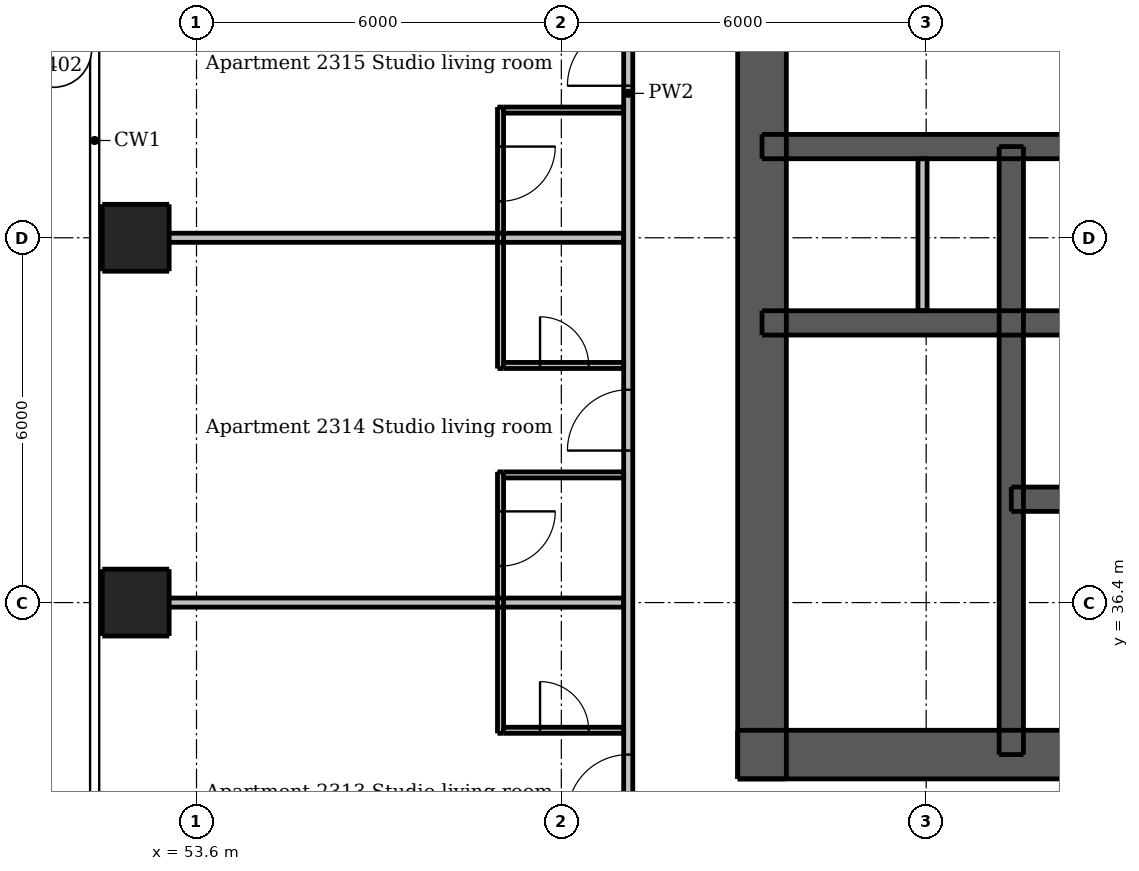
"""IFC4 building model, lengths in metres.
Left out: names, types, materials, properties, quantities, classifications, styles, units other than length and angle.
Written with IfcOpenShell. Run it as: python <this file> out.ifc"""

import sys

from ifc_helpers import new_model, si_unit, direction, frame, frame_2d, origin, origin_2d, place, context, subcontext, project, spatial, rectangle, extrude, element, fill, save


model = new_model("IFC4")
c1 = context("Model", 3, precision=1e-05, world=origin(), true_north=direction((0.0, 1.0)))
c2 = subcontext(c1, "Body", "Model", "MODEL_VIEW")
j1 = project(units=[si_unit("LENGTHUNIT", "METRE"), si_unit("PLANEANGLEUNIT", "RADIAN")], contexts=[c1])
p1 = place(None, origin())
s1 = spatial("IfcSite", under=j1, at=p1, CompositionType="ELEMENT")
p2 = place(p1, origin())
s2 = spatial("IfcBuilding", under=s1, at=p2, CompositionType="ELEMENT")
p3 = place(p2, frame((0.0, 0.0, 88.6)))
s3 = spatial("IfcBuildingStorey", under=s2, at=p3, CompositionType="ELEMENT", Elevation=88.6)
p4 = place(p3, frame((62.5, 33.9, 0.0), z_axis=(0.0, 0.0, 1.0), x_axis=(1.0, 0.0, 0.0)))
e1 = element("IfcWall", 1, at=p4, inside=s3, PredefinedType="SHEAR", context=c2, shape_type="SweptSolid", body=[
    extrude(rectangle(XDim=24.0, YDim=0.8, at=frame_2d((12.0, 0.0))), origin(), (0.0, 0.0, 1.0), 3.05),
])
p5 = place(p4, frame((2.0, 0.0, 0.0)))
e2 = element("IfcOpeningElement", 2, at=p5, cuts=e1, PredefinedType="OPENING", context=c2, shape_type="SweptSolid", body=[
    extrude(rectangle(XDim=1.1, YDim=2.1, at=frame_2d((0.55, 1.05))), frame((0.0, 0.41, 0.0), z_axis=(0.0, -1.0, 0.0), x_axis=(1.0, 0.0, 0.0)), (0.0, 0.0, 1.0), 0.82),
])
p6 = place(p4, frame((20.9, 0.0, 0.0)))
e3 = element("IfcOpeningElement", 3, at=p6, cuts=e1, PredefinedType="OPENING", context=c2, shape_type="SweptSolid", body=[
    extrude(rectangle(XDim=1.1, YDim=2.1, at=frame_2d((0.55, 1.05))), frame((0.0, 0.41, 0.0), z_axis=(0.0, -1.0, 0.0), x_axis=(1.0, 0.0, 0.0)), (0.0, 0.0, 1.0), 0.82),
])
p7 = place(p4, frame((8.0, 0.0, 0.0)))
e4 = element("IfcOpeningElement", 4, at=p7, cuts=e1, PredefinedType="OPENING", context=c2, shape_type="SweptSolid", body=[
    extrude(rectangle(XDim=1.1, YDim=2.1, at=frame_2d((0.55, 1.05))), frame((0.0, 0.41, 0.0), z_axis=(0.0, -1.0, 0.0), x_axis=(1.0, 0.0, 0.0)), (0.0, 0.0, 1.0), 0.82),
])
p8 = place(p4, frame((13.525, 0.0, 0.0)))
e5 = element("IfcOpeningElement", 5, at=p8, cuts=e1, PredefinedType="OPENING", context=c2, shape_type="SweptSolid", body=[
    extrude(rectangle(XDim=0.9, YDim=2.1, at=frame_2d((0.45, 1.05))), frame((0.0, 0.41, 0.0), z_axis=(0.0, -1.0, 0.0), x_axis=(1.0, 0.0, 0.0)), (0.0, 0.0, 1.0), 0.82),
])
p9 = place(p4, frame((17.075, 0.0, 0.0)))
e6 = element("IfcOpeningElement", 6, at=p9, cuts=e1, PredefinedType="OPENING", context=c2, shape_type="SweptSolid", body=[
    extrude(rectangle(XDim=0.9, YDim=2.1, at=frame_2d((0.45, 1.05))), frame((0.0, 0.41, 0.0), z_axis=(0.0, -1.0, 0.0), x_axis=(1.0, 0.0, 0.0)), (0.0, 0.0, 1.0), 0.82),
])
p10 = place(p3, frame((62.9, 33.5, 0.0), z_axis=(0.0, 0.0, 1.0), x_axis=(0.0, 1.0, 0.0)))
e7 = element("IfcWall", 7, at=p10, inside=s3, PredefinedType="SHEAR", context=c2, shape_type="SweptSolid", body=[
    extrude(rectangle(XDim=24.0, YDim=0.8, at=frame_2d((12.0, 0.0))), origin(), (0.0, 0.0, 1.0), 3.05),
])
p11 = place(p10, frame((11.2, 0.0, 0.0)))
e8 = element("IfcOpeningElement", 8, at=p11, cuts=e7, PredefinedType="OPENING", context=c2, shape_type="SweptSolid", body=[
    extrude(rectangle(XDim=1.6, YDim=2.1, at=frame_2d((0.8, 1.05))), frame((0.0, 0.41, 0.0), z_axis=(0.0, -1.0, 0.0), x_axis=(1.0, 0.0, 0.0)), (0.0, 0.0, 1.0), 0.82),
])
p12 = place(p3, frame((62.9, 41.0, 0.0), z_axis=(0.0, 0.0, 1.0), x_axis=(1.0, 0.0, 0.0)))
e9 = element("IfcWall", 9, at=p12, inside=s3, PredefinedType="SHEAR", context=c2, shape_type="SweptSolid", body=[
    extrude(rectangle(XDim=23.2, YDim=0.4, at=frame_2d((11.6, 0.0))), origin(), (0.0, 0.0, 1.0), 3.05),
])
p13 = place(p3, frame((62.9, 43.9, 0.0), z_axis=(0.0, 0.0, 1.0), x_axis=(1.0, 0.0, 0.0)))
e10 = element("IfcWall", 10, at=p13, inside=s3, PredefinedType="SHEAR", context=c2, shape_type="SweptSolid", body=[
    extrude(rectangle(XDim=23.2, YDim=0.4, at=frame_2d((11.6, 0.0))), origin(), (0.0, 0.0, 1.0), 3.05),
])
p14 = place(p13, frame((1.07, 0.0, 0.0)))
e11 = element("IfcOpeningElement", 11, at=p14, cuts=e10, PredefinedType="OPENING", context=c2, shape_type="SweptSolid", body=[
    extrude(rectangle(XDim=0.9, YDim=2.1, at=frame_2d((0.45, 1.05))), frame((0.0, 0.21, 0.0), z_axis=(0.0, -1.0, 0.0), x_axis=(1.0, 0.0, 0.0)), (0.0, 0.0, 1.0), 0.42),
])
p15 = place(p13, frame((2.87, 0.0, 0.0)))
e12 = element("IfcOpeningElement", 12, at=p15, cuts=e10, PredefinedType="OPENING", context=c2, shape_type="SweptSolid", body=[
    extrude(rectangle(XDim=0.8, YDim=2.1, at=frame_2d((0.4, 1.05))), frame((0.0, 0.21, 0.0), z_axis=(0.0, -1.0, 0.0), x_axis=(1.0, 0.0, 0.0)), (0.0, 0.0, 1.0), 0.42),
])
p16 = place(p13, frame((20.6, 0.0, 0.0)))
e13 = element("IfcOpeningElement", 13, at=p16, cuts=e10, PredefinedType="OPENING", context=c2, shape_type="SweptSolid", body=[
    extrude(rectangle(XDim=0.9, YDim=2.1, at=frame_2d((0.45, 1.05))), frame((0.0, 0.21, 0.0), z_axis=(0.0, -1.0, 0.0), x_axis=(1.0, 0.0, 0.0)), (0.0, 0.0, 1.0), 0.42),
])
p17 = place(p13, frame((4.8, 0.0, 0.0)))
e14 = element("IfcOpeningElement", 14, at=p17, cuts=e10, PredefinedType="OPENING", context=c2, shape_type="SweptSolid", body=[
    extrude(rectangle(XDim=1.1, YDim=2.1, at=frame_2d((0.55, 1.05))), frame((0.0, 0.21, 0.0), z_axis=(0.0, -1.0, 0.0), x_axis=(1.0, 0.0, 0.0)), (0.0, 0.0, 1.0), 0.42),
])
p18 = place(p13, frame((7.3, 0.0, 0.0)))
e15 = element("IfcOpeningElement", 15, at=p18, cuts=e10, PredefinedType="OPENING", context=c2, shape_type="SweptSolid", body=[
    extrude(rectangle(XDim=1.1, YDim=2.1, at=frame_2d((0.55, 1.05))), frame((0.0, 0.21, 0.0), z_axis=(0.0, -1.0, 0.0), x_axis=(1.0, 0.0, 0.0)), (0.0, 0.0, 1.0), 0.42),
])
p19 = place(p13, frame((9.8, 0.0, 0.0)))
e16 = element("IfcOpeningElement", 16, at=p19, cuts=e10, PredefinedType="OPENING", context=c2, shape_type="SweptSolid", body=[
    extrude(rectangle(XDim=1.1, YDim=2.1, at=frame_2d((0.55, 1.05))), frame((0.0, 0.21, 0.0), z_axis=(0.0, -1.0, 0.0), x_axis=(1.0, 0.0, 0.0)), (0.0, 0.0, 1.0), 0.42),
])
p20 = place(p13, frame((12.3, 0.0, 0.0)))
e17 = element("IfcOpeningElement", 17, at=p20, cuts=e10, PredefinedType="OPENING", context=c2, shape_type="SweptSolid", body=[
    extrude(rectangle(XDim=1.1, YDim=2.1, at=frame_2d((0.55, 1.05))), frame((0.0, 0.21, 0.0), z_axis=(0.0, -1.0, 0.0), x_axis=(1.0, 0.0, 0.0)), (0.0, 0.0, 1.0), 0.42),
])
p21 = place(p13, frame((14.8, 0.0, 0.0)))
e18 = element("IfcOpeningElement", 18, at=p21, cuts=e10, PredefinedType="OPENING", context=c2, shape_type="SweptSolid", body=[
    extrude(rectangle(XDim=1.1, YDim=2.1, at=frame_2d((0.55, 1.05))), frame((0.0, 0.21, 0.0), z_axis=(0.0, -1.0, 0.0), x_axis=(1.0, 0.0, 0.0)), (0.0, 0.0, 1.0), 0.42),
])
p22 = place(p13, frame((17.3, 0.0, 0.0)))
e19 = element("IfcOpeningElement", 19, at=p22, cuts=e10, PredefinedType="OPENING", context=c2, shape_type="SweptSolid", body=[
    extrude(rectangle(XDim=1.1, YDim=2.1, at=frame_2d((0.55, 1.05))), frame((0.0, 0.21, 0.0), z_axis=(0.0, -1.0, 0.0), x_axis=(1.0, 0.0, 0.0)), (0.0, 0.0, 1.0), 0.42),
])
p23 = place(p3, frame((67.0, 33.9, 0.0), z_axis=(0.0, 0.0, 1.0), x_axis=(0.0, 1.0, 0.0)))
e20 = element("IfcWall", 20, at=p23, inside=s3, PredefinedType="SHEAR", context=c2, shape_type="SweptSolid", body=[
    extrude(rectangle(XDim=10.0, YDim=0.4, at=frame_2d((5.0, 0.0))), origin(), (0.0, 0.0, 1.0), 3.05),
])
p24 = place(p23, frame((0.6, 0.0, 0.0)))
e21 = element("IfcOpeningElement", 21, at=p24, cuts=e20, PredefinedType="OPENING", context=c2, shape_type="SweptSolid", body=[
    extrude(rectangle(XDim=1.1, YDim=2.1, at=frame_2d((0.55, 1.05))), frame((0.0, 0.21, 0.0), z_axis=(0.0, -1.0, 0.0), x_axis=(1.0, 0.0, 0.0)), (0.0, 0.0, 1.0), 0.42),
])
p25 = place(p3, frame((67.0, 38.1, 0.0), z_axis=(0.0, 0.0, 1.0), x_axis=(1.0, 0.0, 0.0)))
e22 = element("IfcWall", 22, at=p25, inside=s3, PredefinedType="SHEAR", context=c2, shape_type="SweptSolid", body=[
    extrude(rectangle(XDim=7.5, YDim=0.4, at=frame_2d((3.75, 0.0))), origin(), (0.0, 0.0, 1.0), 3.05),
])
p26 = place(p25, frame((0.7, 0.0, 0.0)))
e23 = element("IfcOpeningElement", 23, at=p26, cuts=e22, PredefinedType="OPENING", context=c2, shape_type="SweptSolid", body=[
    extrude(rectangle(XDim=1.1, YDim=2.1, at=frame_2d((0.55, 1.05))), frame((0.0, 0.21, 0.0), z_axis=(0.0, -1.0, 0.0), x_axis=(1.0, 0.0, 0.0)), (0.0, 0.0, 1.0), 0.42),
])
p27 = place(p25, frame((3.2, 0.0, 0.0)))
e24 = element("IfcOpeningElement", 24, at=p27, cuts=e22, PredefinedType="OPENING", context=c2, shape_type="SweptSolid", body=[
    extrude(rectangle(XDim=1.1, YDim=2.1, at=frame_2d((0.55, 1.05))), frame((0.0, 0.21, 0.0), z_axis=(0.0, -1.0, 0.0), x_axis=(1.0, 0.0, 0.0)), (0.0, 0.0, 1.0), 0.42),
])
p28 = place(p25, frame((5.65, 0.0, 0.0)))
e25 = element("IfcOpeningElement", 25, at=p28, cuts=e22, PredefinedType="OPENING", context=c2, shape_type="SweptSolid", body=[
    extrude(rectangle(XDim=1.2, YDim=2.1, at=frame_2d((0.6, 1.05))), frame((0.0, 0.21, 0.0), z_axis=(0.0, -1.0, 0.0), x_axis=(1.0, 0.0, 0.0)), (0.0, 0.0, 1.0), 0.42),
])
for number, where, z_axis, x_axis in (
    (26, (52.6, 36.4, 0.0), (0.0, 0.0, 1.0), (1.0, 0.0, 0.0)),
    (27, (52.6, 42.4, 0.0), (0.0, 0.0, 1.0), (1.0, 0.0, 0.0)),
):
    element("IfcColumn", number, at=place(p3, frame(where, z_axis=z_axis, x_axis=x_axis)), inside=s3, PredefinedType="COLUMN", context=c2, shape_type="SweptSolid", body=[
        extrude(rectangle(XDim=1.1, YDim=1.1, at=origin_2d()), origin(), (0.0, 0.0, 1.0), 3.05),
    ])
p29 = place(p3, frame((65.54, 41.2, 0.0), z_axis=(0.0, 0.0, 1.0), x_axis=(0.0, 1.0, 0.0)))
e28 = element("IfcWall", 28, at=p29, inside=s3, PredefinedType="PLUMBINGWALL", context=c2, shape_type="SweptSolid", body=[
    extrude(rectangle(XDim=2.5, YDim=0.15, at=frame_2d((1.25, 0.0))), origin(), (0.0, 0.0, 1.0), 3.05),
])
p30 = place(p3, frame((58.6, 38.55, 0.0), z_axis=(0.0, 0.0, 1.0), x_axis=(0.0, -1.0, 0.0)))
e29 = element("IfcWall", 29, at=p30, inside=s3, PredefinedType="PARTITIONING", context=c2, shape_type="SweptSolid", body=[
    extrude(rectangle(XDim=4.3, YDim=0.1, at=frame_2d((2.15, 0.0))), origin(), (0.0, 0.0, 1.0), 3.05),
])
p31 = place(p30, frame((0.65, 0.0, 0.0)))
e30 = element("IfcOpeningElement", 30, at=p31, cuts=e29, PredefinedType="OPENING", context=c2, shape_type="SweptSolid", body=[
    extrude(rectangle(XDim=0.9, YDim=2.1, at=frame_2d((0.45, 1.05))), frame((0.0, 0.06, 0.0), z_axis=(0.0, -1.0, 0.0), x_axis=(1.0, 0.0, 0.0)), (0.0, 0.0, 1.0), 0.12),
])
p32 = place(p3, frame((58.6, 44.55, 0.0), z_axis=(0.0, 0.0, 1.0), x_axis=(0.0, -1.0, 0.0)))
e31 = element("IfcWall", 31, at=p32, inside=s3, PredefinedType="PARTITIONING", context=c2, shape_type="SweptSolid", body=[
    extrude(rectangle(XDim=4.3, YDim=0.1, at=frame_2d((2.15, 0.0))), origin(), (0.0, 0.0, 1.0), 3.05),
])
p33 = place(p32, frame((0.65, 0.0, 0.0)))
e32 = element("IfcOpeningElement", 32, at=p33, cuts=e31, PredefinedType="OPENING", context=c2, shape_type="SweptSolid", body=[
    extrude(rectangle(XDim=0.9, YDim=2.1, at=frame_2d((0.45, 1.05))), frame((0.0, 0.06, 0.0), z_axis=(0.0, -1.0, 0.0), x_axis=(1.0, 0.0, 0.0)), (0.0, 0.0, 1.0), 0.12),
])
p34 = place(p3, frame((58.65, 44.5, 0.0), z_axis=(0.0, 0.0, 1.0), x_axis=(1.0, 0.0, 0.0)))
e33 = element("IfcWall", 33, at=p34, inside=s3, PredefinedType="PARTITIONING", context=c2, shape_type="SweptSolid", body=[
    extrude(rectangle(XDim=1.975, YDim=0.1, at=frame_2d((0.988, 0.0))), origin(), (0.0, 0.0, 1.0), 3.05),
])
p35 = place(p3, frame((58.65, 40.3, 0.0), z_axis=(0.0, 0.0, 1.0), x_axis=(1.0, 0.0, 0.0)))
e34 = element("IfcWall", 34, at=p35, inside=s3, PredefinedType="PARTITIONING", context=c2, shape_type="SweptSolid", body=[
    extrude(rectangle(XDim=1.975, YDim=0.1, at=frame_2d((0.988, 0.0))), origin(), (0.0, 0.0, 1.0), 3.05),
])
p36 = place(p35, frame((0.6, 0.0, 0.0)))
e35 = element("IfcOpeningElement", 35, at=p36, cuts=e34, PredefinedType="OPENING", context=c2, shape_type="SweptSolid", body=[
    extrude(rectangle(XDim=0.8, YDim=2.1, at=frame_2d((0.4, 1.05))), frame((0.0, 0.06, 0.0), z_axis=(0.0, -1.0, 0.0), x_axis=(1.0, 0.0, 0.0)), (0.0, 0.0, 1.0), 0.12),
])
p37 = place(p3, frame((58.65, 38.5, 0.0), z_axis=(0.0, 0.0, 1.0), x_axis=(1.0, 0.0, 0.0)))
e36 = element("IfcWall", 36, at=p37, inside=s3, PredefinedType="PARTITIONING", context=c2, shape_type="SweptSolid", body=[
    extrude(rectangle(XDim=1.975, YDim=0.1, at=frame_2d((0.988, 0.0))), origin(), (0.0, 0.0, 1.0), 3.05),
])
p38 = place(p3, frame((58.65, 34.3, 0.0), z_axis=(0.0, 0.0, 1.0), x_axis=(1.0, 0.0, 0.0)))
e37 = element("IfcWall", 37, at=p38, inside=s3, PredefinedType="PARTITIONING", context=c2, shape_type="SweptSolid", body=[
    extrude(rectangle(XDim=1.975, YDim=0.1, at=frame_2d((0.988, 0.0))), origin(), (0.0, 0.0, 1.0), 3.05),
])
p39 = place(p38, frame((0.6, 0.0, 0.0)))
e38 = element("IfcOpeningElement", 38, at=p39, cuts=e37, PredefinedType="OPENING", context=c2, shape_type="SweptSolid", body=[
    extrude(rectangle(XDim=0.8, YDim=2.1, at=frame_2d((0.4, 1.05))), frame((0.0, 0.06, 0.0), z_axis=(0.0, -1.0, 0.0), x_axis=(1.0, 0.0, 0.0)), (0.0, 0.0, 1.0), 0.12),
])
p40 = place(p3, frame((60.7, 30.325, 0.0), z_axis=(0.0, 0.0, 1.0), x_axis=(0.0, 1.0, 0.0)))
e39 = element("IfcWall", 39, at=p40, inside=s3, PredefinedType="PARTITIONING", context=c2, shape_type="SweptSolid", body=[
    extrude(rectangle(XDim=28.9, YDim=0.15, at=frame_2d((14.45, 0.0))), origin(), (0.0, 0.0, 1.0), 3.05),
])
p41 = place(p40, frame((2.575, 0.0, 0.0)))
e40 = element("IfcOpeningElement", 40, at=p41, cuts=e39, PredefinedType="OPENING", context=c2, shape_type="SweptSolid", body=[
    extrude(rectangle(XDim=1.0, YDim=2.1, at=frame_2d((0.5, 1.05))), frame((0.0, 0.085, 0.0), z_axis=(0.0, -1.0, 0.0), x_axis=(1.0, 0.0, 0.0)), (0.0, 0.0, 1.0), 0.17),
])
p42 = place(p40, frame((8.575, 0.0, 0.0)))
e41 = element("IfcOpeningElement", 41, at=p42, cuts=e39, PredefinedType="OPENING", context=c2, shape_type="SweptSolid", body=[
    extrude(rectangle(XDim=1.0, YDim=2.1, at=frame_2d((0.5, 1.05))), frame((0.0, 0.085, 0.0), z_axis=(0.0, -1.0, 0.0), x_axis=(1.0, 0.0, 0.0)), (0.0, 0.0, 1.0), 0.17),
])
p43 = place(p40, frame((14.575, 0.0, 0.0)))
e42 = element("IfcOpeningElement", 42, at=p43, cuts=e39, PredefinedType="OPENING", context=c2, shape_type="SweptSolid", body=[
    extrude(rectangle(XDim=1.0, YDim=2.1, at=frame_2d((0.5, 1.05))), frame((0.0, 0.085, 0.0), z_axis=(0.0, -1.0, 0.0), x_axis=(1.0, 0.0, 0.0)), (0.0, 0.0, 1.0), 0.17),
])
p44 = place(p40, frame((26.025, 0.0, 0.0)))
e43 = element("IfcOpeningElement", 43, at=p44, cuts=e39, PredefinedType="OPENING", context=c2, shape_type="SweptSolid", body=[
    extrude(rectangle(XDim=1.0, YDim=2.1, at=frame_2d((0.5, 1.05))), frame((0.0, 0.085, 0.0), z_axis=(0.0, -1.0, 0.0), x_axis=(1.0, 0.0, 0.0)), (0.0, 0.0, 1.0), 0.17),
])
for number, where, z_axis, x_axis in (
    (44, (52.0, 42.4, 0.0), (0.0, 0.0, 1.0), (1.0, 0.0, 0.0)),
    (45, (52.0, 36.4, 0.0), (0.0, 0.0, 1.0), (1.0, 0.0, 0.0)),
):
    element("IfcWall", number, at=place(p3, frame(where, z_axis=z_axis, x_axis=x_axis)), inside=s3, PredefinedType="PARTITIONING", context=c2, shape_type="SweptSolid", body=[
        extrude(rectangle(XDim=8.625, YDim=0.15, at=frame_2d((4.312, 0.0))), origin(), (0.0, 0.0, 1.0), 2.516),
    ])
p45 = place(p5, origin())
e46 = element("IfcDoor", 46, at=p45, inside=s3, OperationType="SINGLE_SWING_LEFT", PredefinedType="DOOR", context=c2, shape_type="SweptSolid", body=[
    extrude(rectangle(XDim=1.1, YDim=2.1, at=frame_2d((0.55, 1.05))), frame((0.0, 0.388, 0.0), z_axis=(0.0, -1.0, 0.0), x_axis=(1.0, 0.0, 0.0)), (0.0, 0.0, 1.0), 0.05),
])
fill(e2, e46)
p46 = place(p11, origin())
e47 = element("IfcDoor", 47, at=p46, inside=s3, OperationType="DOUBLE_DOOR_SINGLE_SWING", PredefinedType="DOOR", context=c2, shape_type="SweptSolid", body=[
    extrude(rectangle(XDim=1.6, YDim=2.1, at=frame_2d((0.8, 1.05))), frame((0.0, -0.337, 0.0), z_axis=(0.0, -1.0, 0.0), x_axis=(1.0, 0.0, 0.0)), (0.0, 0.0, 1.0), 0.05),
])
fill(e8, e47)
p47 = place(p24, origin())
e48 = element("IfcDoor", 48, at=p47, inside=s3, OperationType="SINGLE_SWING_RIGHT", PredefinedType="DOOR", context=c2, shape_type="SweptSolid", body=[
    extrude(rectangle(XDim=1.1, YDim=2.1, at=frame_2d((0.55, 1.05))), frame((0.0, -0.138, 0.0), z_axis=(0.0, -1.0, 0.0), x_axis=(1.0, 0.0, 0.0)), (0.0, 0.0, 1.0), 0.05),
])
fill(e21, e48)
p48 = place(p14, origin())
e49 = element("IfcDoor", 49, at=p48, inside=s3, OperationType="SINGLE_SWING_LEFT", PredefinedType="DOOR", context=c2, shape_type="SweptSolid", body=[
    extrude(rectangle(XDim=0.9, YDim=2.1, at=frame_2d((0.45, 1.05))), frame((0.0, -0.138, 0.0), z_axis=(0.0, -1.0, 0.0), x_axis=(1.0, 0.0, 0.0)), (0.0, 0.0, 1.0), 0.05),
])
fill(e11, e49)
p49 = place(p15, origin())
e50 = element("IfcDoor", 50, at=p49, inside=s3, OperationType="SINGLE_SWING_RIGHT", PredefinedType="DOOR", context=c2, shape_type="SweptSolid", body=[
    extrude(rectangle(XDim=0.8, YDim=2.1, at=frame_2d((0.4, 1.05))), frame((0.0, -0.138, 0.0), z_axis=(0.0, -1.0, 0.0), x_axis=(1.0, 0.0, 0.0)), (0.0, 0.0, 1.0), 0.05),
])
fill(e12, e50)
p50 = place(p17, origin())
e51 = element("IfcDoor", 51, at=p50, inside=s3, OperationType="DOUBLE_DOOR_SLIDING", PredefinedType="DOOR", context=c2, shape_type="SweptSolid", body=[
    extrude(rectangle(XDim=1.1, YDim=2.1, at=frame_2d((0.55, 1.05))), frame((0.0, 0.025, 0.0), z_axis=(0.0, -1.0, 0.0), x_axis=(1.0, 0.0, 0.0)), (0.0, 0.0, 1.0), 0.05),
])
fill(e14, e51)
p51 = place(p26, origin())
e52 = element("IfcDoor", 52, at=p51, inside=s3, OperationType="DOUBLE_DOOR_SLIDING", PredefinedType="DOOR", context=c2, shape_type="SweptSolid", body=[
    extrude(rectangle(XDim=1.1, YDim=2.1, at=frame_2d((0.55, 1.05))), frame((0.0, 0.025, 0.0), z_axis=(0.0, -1.0, 0.0), x_axis=(1.0, 0.0, 0.0)), (0.0, 0.0, 1.0), 0.05),
])
fill(e23, e52)
p52 = place(p41, origin())
e53 = element("IfcDoor", 53, at=p52, inside=s3, OperationType="SINGLE_SWING_LEFT", PredefinedType="DOOR", context=c2, shape_type="SweptSolid", body=[
    extrude(rectangle(XDim=1.0, YDim=2.1, at=frame_2d((0.5, 1.05))), frame((0.0, 0.025, 0.0), z_axis=(0.0, -1.0, 0.0), x_axis=(1.0, 0.0, 0.0)), (0.0, 0.0, 1.0), 0.05),
])
fill(e40, e53)
p53 = place(p39, origin())
e54 = element("IfcDoor", 54, at=p53, inside=s3, OperationType="SINGLE_SWING_LEFT", PredefinedType="DOOR", context=c2, shape_type="SweptSolid", body=[
    extrude(rectangle(XDim=0.8, YDim=2.1, at=frame_2d((0.4, 1.05))), frame((0.0, 0.025, 0.0), z_axis=(0.0, -1.0, 0.0), x_axis=(1.0, 0.0, 0.0)), (0.0, 0.0, 1.0), 0.05),
])
fill(e38, e54)
p54 = place(p42, origin())
e55 = element("IfcDoor", 55, at=p54, inside=s3, OperationType="SINGLE_SWING_LEFT", PredefinedType="DOOR", context=c2, shape_type="SweptSolid", body=[
    extrude(rectangle(XDim=1.0, YDim=2.1, at=frame_2d((0.5, 1.05))), frame((0.0, 0.025, 0.0), z_axis=(0.0, -1.0, 0.0), x_axis=(1.0, 0.0, 0.0)), (0.0, 0.0, 1.0), 0.05),
])
fill(e41, e55)
p55 = place(p31, origin())
e56 = element("IfcDoor", 56, at=p55, inside=s3, OperationType="SINGLE_SWING_LEFT", PredefinedType="DOOR", context=c2, shape_type="SweptSolid", body=[
    extrude(rectangle(XDim=0.9, YDim=2.1, at=frame_2d((0.45, 1.05))), frame((0.0, 0.025, 0.0), z_axis=(0.0, -1.0, 0.0), x_axis=(1.0, 0.0, 0.0)), (0.0, 0.0, 1.0), 0.05),
])
fill(e30, e56)
p56 = place(p36, origin())
e57 = element("IfcDoor", 57, at=p56, inside=s3, OperationType="SINGLE_SWING_LEFT", PredefinedType="DOOR", context=c2, shape_type="SweptSolid", body=[
    extrude(rectangle(XDim=0.8, YDim=2.1, at=frame_2d((0.4, 1.05))), frame((0.0, 0.025, 0.0), z_axis=(0.0, -1.0, 0.0), x_axis=(1.0, 0.0, 0.0)), (0.0, 0.0, 1.0), 0.05),
])
fill(e35, e57)
p57 = place(p43, origin())
e58 = element("IfcDoor", 58, at=p57, inside=s3, OperationType="SINGLE_SWING_LEFT", PredefinedType="DOOR", context=c2, shape_type="SweptSolid", body=[
    extrude(rectangle(XDim=1.0, YDim=2.1, at=frame_2d((0.5, 1.05))), frame((0.0, 0.025, 0.0), z_axis=(0.0, -1.0, 0.0), x_axis=(1.0, 0.0, 0.0)), (0.0, 0.0, 1.0), 0.05),
])
fill(e42, e58)
p58 = place(p33, origin())
e59 = element("IfcDoor", 59, at=p58, inside=s3, OperationType="SINGLE_SWING_LEFT", PredefinedType="DOOR", context=c2, shape_type="SweptSolid", body=[
    extrude(rectangle(XDim=0.9, YDim=2.1, at=frame_2d((0.45, 1.05))), frame((0.0, 0.025, 0.0), z_axis=(0.0, -1.0, 0.0), x_axis=(1.0, 0.0, 0.0)), (0.0, 0.0, 1.0), 0.05),
])
fill(e32, e59)
save(model, sys.argv[1])
